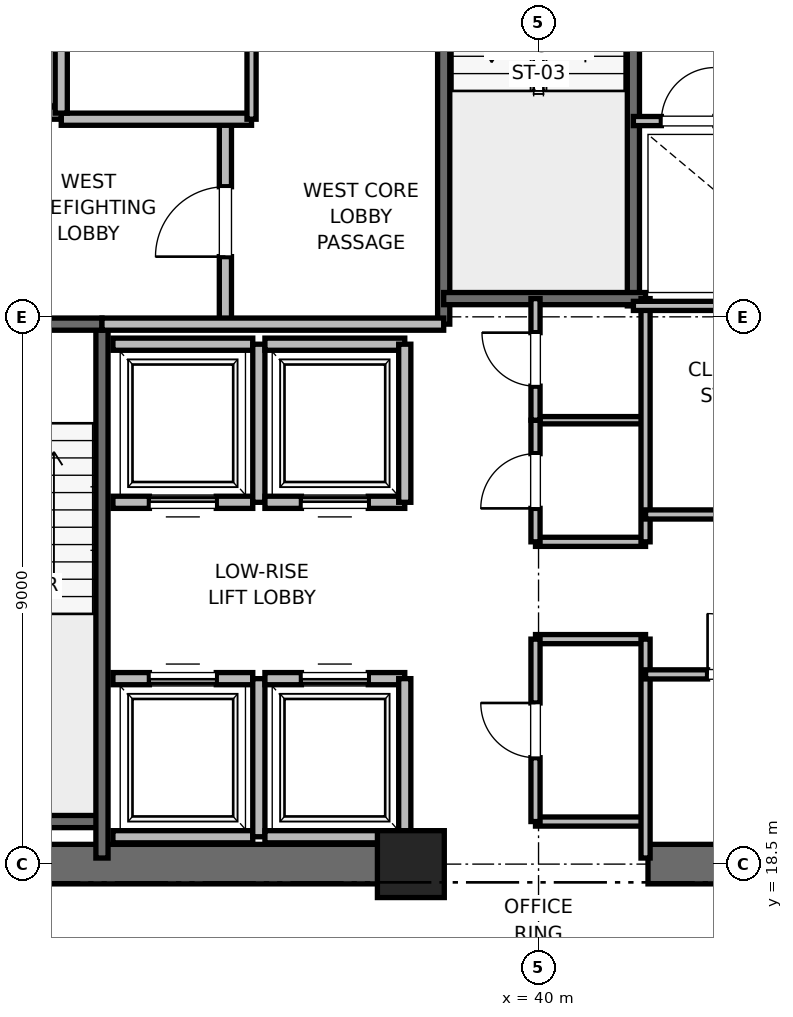
"""IFC4 building model, lengths in metres.
Left out: names, types, materials, properties, quantities, classifications, styles, units other than length and angle.
Written with IfcOpenShell. Run it as: python <this file> out.ifc"""

import sys

from ifc_helpers import new_model, si_unit, direction, frame, frame_2d, origin, origin_2d, place, context, subcontext, project, spatial, rectangle, extrude, element, fill, save


model = new_model("IFC4")
c1 = context("Model", 3, precision=1e-05, world=origin(), true_north=direction((0.0, 1.0)))
c2 = subcontext(c1, "Body", "Model", "MODEL_VIEW")
j1 = project(units=[si_unit("LENGTHUNIT", "METRE"), si_unit("PLANEANGLEUNIT", "RADIAN")], contexts=[c1])
p1 = place(None, origin())
s1 = spatial("IfcSite", under=j1, at=p1, CompositionType="ELEMENT")
p2 = place(p1, origin())
s2 = spatial("IfcBuilding", under=s1, at=p2, CompositionType="ELEMENT")
p3 = place(p2, frame((0.0, 0.0, 47.6)))
s3 = spatial("IfcBuildingStorey", under=s2, at=p3, CompositionType="ELEMENT", Elevation=47.6)
p4 = place(p3, frame((37.9, 18.5, 0.0), z_axis=(0.0, 0.0, 1.0), x_axis=(1.0, 0.0, 0.0)))
e1 = element("IfcColumn", 1, at=p4, inside=s3, PredefinedType="PILASTER", context=c2, shape_type="SweptSolid", body=[
    extrude(rectangle(XDim=1.1, YDim=1.1, at=origin_2d()), origin(), (0.0, 0.0, 1.0), 4.0),
])
for number, where, z_axis, x_axis in (
    (2, (29.0, 18.5, 0.0), (0.0, 0.0, 1.0), (1.0, 0.0, 0.0)),
    (3, (41.8, 18.5, 0.0), (0.0, 0.0, 1.0), (1.0, 0.0, 0.0)),
):
    element("IfcWall", number, at=place(p3, frame(where, z_axis=z_axis, x_axis=x_axis)), inside=s3, PredefinedType="SHEAR", context=c2, shape_type="SweptSolid", body=[
        extrude(rectangle(XDim=9.2, YDim=0.65, at=frame_2d((4.6, 0.0))), origin(), (0.0, 0.0, 1.0), 3.76),
    ])
p5 = place(p3, frame((29.7, 19.2, 0.0), z_axis=(0.0, 0.0, 1.0), x_axis=(1.0, 0.0, 0.0)))
e4 = element("IfcWall", 4, at=p5, inside=s3, PredefinedType="SOLIDWALL", context=c2, shape_type="SweptSolid", body=[
    extrude(rectangle(XDim=3.12, YDim=0.2, at=frame_2d((1.56, 0.0))), origin(), (0.0, 0.0, 1.0), 3.76),
])
p6 = place(p3, frame((32.82, 18.6, 0.0), z_axis=(0.0, 0.0, 1.0), x_axis=(0.0, 1.0, 0.0)))
e5 = element("IfcWall", 5, at=p6, inside=s3, PredefinedType="SOLIDWALL", context=c2, shape_type="SweptSolid", body=[
    extrude(rectangle(XDim=8.78, YDim=0.2, at=frame_2d((4.39, 0.0))), origin(), (0.0, 0.0, 1.0), 3.76),
])
p7 = place(p3, frame((29.7, 27.38, 0.0), z_axis=(0.0, 0.0, 1.0), x_axis=(1.0, 0.0, 0.0)))
e6 = element("IfcWall", 6, at=p7, inside=s3, PredefinedType="SOLIDWALL", context=c2, shape_type="SweptSolid", body=[
    extrude(rectangle(XDim=3.12, YDim=0.2, at=frame_2d((1.56, 0.0))), origin(), (0.0, 0.0, 1.0), 3.76),
])
p8 = place(p7, frame((1.01, 0.0, 0.0)))
e7 = element("IfcOpeningElement", 7, at=p8, cuts=e6, PredefinedType="OPENING", context=c2, shape_type="SweptSolid", body=[
    extrude(rectangle(XDim=1.1, YDim=2.15, at=frame_2d((0.55, 1.075))), frame((0.0, 0.1, 0.0), z_axis=(0.0, -1.0, 0.0), x_axis=(1.0, 0.0, 0.0)), (0.0, 0.0, 1.0), 0.2),
])
p9 = place(p3, frame((38.44, 27.38, 0.0), z_axis=(0.0, 0.0, 1.0), x_axis=(0.0, 1.0, 0.0)))
e8 = element("IfcWall", 8, at=p9, inside=s3, PredefinedType="SOLIDWALL", context=c2, shape_type="SweptSolid", body=[
    extrude(rectangle(XDim=8.87, YDim=0.2, at=frame_2d((4.435, 0.0))), origin(), (0.0, 0.0, 1.0), 3.76),
])
p10 = place(p3, frame((41.56, 27.68, 0.0), z_axis=(0.0, 0.0, 1.0), x_axis=(0.0, 1.0, 0.0)))
e9 = element("IfcWall", 9, at=p10, inside=s3, PredefinedType="SOLIDWALL", context=c2, shape_type="SweptSolid", body=[
    extrude(rectangle(XDim=8.57, YDim=0.2, at=frame_2d((4.285, 0.0))), origin(), (0.0, 0.0, 1.0), 3.76),
])
p11 = place(p3, frame((38.44, 27.8, 0.0), z_axis=(0.0, 0.0, 1.0), x_axis=(1.0, 0.0, 0.0)))
e10 = element("IfcWall", 10, at=p11, inside=s3, PredefinedType="SOLIDWALL", context=c2, shape_type="SweptSolid", body=[
    extrude(rectangle(XDim=3.32, YDim=0.2, at=frame_2d((1.66, 0.0))), origin(), (0.0, 0.0, 1.0), 3.76),
])
p12 = place(p3, frame((34.85, 27.38, 0.0), z_axis=(0.0, 0.0, 1.0), x_axis=(0.0, 1.0, 0.0)))
e11 = element("IfcWall", 11, at=p12, inside=s3, PredefinedType="PARTITIONING", context=c2, shape_type="SweptSolid", body=[
    extrude(rectangle(XDim=3.37, YDim=0.2, at=frame_2d((1.685, 0.0))), origin(), (0.0, 0.0, 1.0), 3.76),
])
p13 = place(p12, frame((1.11, 0.0, 0.0)))
e12 = element("IfcOpeningElement", 12, at=p13, cuts=e11, PredefinedType="OPENING", context=c2, shape_type="SweptSolid", body=[
    extrude(rectangle(XDim=1.15, YDim=2.2, at=frame_2d((0.575, 1.1))), frame((0.0, 0.1, 0.0), z_axis=(0.0, -1.0, 0.0), x_axis=(1.0, 0.0, 0.0)), (0.0, 0.0, 1.0), 0.2),
])
p14 = place(p3, frame((32.82, 27.38, 0.0), z_axis=(0.0, 0.0, 1.0), x_axis=(1.0, 0.0, 0.0)))
e13 = element("IfcWall", 13, at=p14, inside=s3, PredefinedType="PARTITIONING", context=c2, shape_type="SweptSolid", body=[
    extrude(rectangle(XDim=5.62, YDim=0.2, at=frame_2d((2.81, 0.0))), origin(), (0.0, 0.0, 1.0), 3.76),
])
p15 = place(p3, frame((32.15, 30.75, 0.0), z_axis=(0.0, 0.0, 1.0), x_axis=(1.0, 0.0, 0.0)))
e14 = element("IfcWall", 14, at=p15, inside=s3, PredefinedType="PARTITIONING", context=c2, shape_type="SweptSolid", body=[
    extrude(rectangle(XDim=3.13, YDim=0.2, at=frame_2d((1.565, 0.0))), origin(), (0.0, 0.0, 1.0), 3.76),
])
p16 = place(p3, frame((29.55, 30.85, 0.0), z_axis=(0.0, 0.0, 1.0), x_axis=(1.0, 0.0, 0.0)))
e15 = element("IfcWall", 15, at=p16, inside=s3, PredefinedType="SOLIDWALL", context=c2, shape_type="SweptSolid", body=[
    extrude(rectangle(XDim=2.6, YDim=0.2, at=frame_2d((1.3, 0.0))), origin(), (0.0, 0.0, 1.0), 2.54),
])
p17 = place(p16, frame((0.75, 0.0, 0.0)))
e16 = element("IfcOpeningElement", 16, at=p17, cuts=e15, PredefinedType="OPENING", context=c2, shape_type="SweptSolid", body=[
    extrude(rectangle(XDim=1.1, YDim=2.2, at=frame_2d((0.55, 1.1))), frame((0.0, 0.1, 0.0), z_axis=(0.0, -1.0, 0.0), x_axis=(1.0, 0.0, 0.0)), (0.0, 0.0, 1.0), 0.2),
])
p18 = place(p3, frame((32.15, 30.85, 0.0), z_axis=(0.0, 0.0, 1.0), x_axis=(0.0, 1.0, 0.0)))
e17 = element("IfcWall", 17, at=p18, inside=s3, PredefinedType="SOLIDWALL", context=c2, shape_type="SweptSolid", body=[
    extrude(rectangle(XDim=3.0, YDim=0.2, at=frame_2d((1.5, 0.0))), origin(), (0.0, 0.0, 1.0), 3.76),
])
p19 = place(p3, frame((33.0, 18.95, 0.0), z_axis=(0.0, 0.0, 1.0), x_axis=(1.0, 0.0, 0.0)))
e18 = element("IfcWall", 18, at=p19, inside=s3, PredefinedType="SOLIDWALL", context=c2, shape_type="SweptSolid", body=[
    extrude(rectangle(XDim=2.3, YDim=0.2, at=frame_2d((1.15, 0.0))), origin(), (0.0, 0.0, 1.0), 3.76),
])
p20 = place(p3, frame((35.3, 21.55, 0.0), z_axis=(0.0, 0.0, 1.0), x_axis=(-1.0, 0.0, 0.0)))
e19 = element("IfcWall", 19, at=p20, inside=s3, PredefinedType="SOLIDWALL", context=c2, shape_type="SweptSolid", body=[
    extrude(rectangle(XDim=2.3, YDim=0.2, at=frame_2d((1.15, 0.0))), origin(), (0.0, 0.0, 1.0), 3.76),
])
p21 = place(p20, frame((0.6, 0.0, 0.0)))
e20 = element("IfcOpeningElement", 20, at=p21, cuts=e19, PredefinedType="OPENING", context=c2, shape_type="SweptSolid", body=[
    extrude(rectangle(XDim=1.1, YDim=2.2, at=frame_2d((0.55, 1.1))), frame((0.0, 0.1, 0.0), z_axis=(0.0, -1.0, 0.0), x_axis=(1.0, 0.0, 0.0)), (0.0, 0.0, 1.0), 0.2),
])
p22 = place(p3, frame((35.4, 18.95, 0.0), z_axis=(0.0, 0.0, 1.0), x_axis=(0.0, 1.0, 0.0)))
e21 = element("IfcWall", 21, at=p22, inside=s3, PredefinedType="SOLIDWALL", context=c2, shape_type="SweptSolid", body=[
    extrude(rectangle(XDim=2.6, YDim=0.2, at=frame_2d((1.3, 0.0))), origin(), (0.0, 0.0, 1.0), 3.76),
])
p23 = place(p3, frame((35.5, 18.95, 0.0), z_axis=(0.0, 0.0, 1.0), x_axis=(1.0, 0.0, 0.0)))
e22 = element("IfcWall", 22, at=p23, inside=s3, PredefinedType="SOLIDWALL", context=c2, shape_type="SweptSolid", body=[
    extrude(rectangle(XDim=2.3, YDim=0.2, at=frame_2d((1.15, 0.0))), origin(), (0.0, 0.0, 1.0), 2.54),
])
p24 = place(p3, frame((37.8, 21.55, 0.0), z_axis=(0.0, 0.0, 1.0), x_axis=(-1.0, 0.0, 0.0)))
e23 = element("IfcWall", 23, at=p24, inside=s3, PredefinedType="SOLIDWALL", context=c2, shape_type="SweptSolid", body=[
    extrude(rectangle(XDim=2.3, YDim=0.2, at=frame_2d((1.15, 0.0))), origin(), (0.0, 0.0, 1.0), 3.76),
])
p25 = place(p24, frame((0.6, 0.0, 0.0)))
e24 = element("IfcOpeningElement", 24, at=p25, cuts=e23, PredefinedType="OPENING", context=c2, shape_type="SweptSolid", body=[
    extrude(rectangle(XDim=1.1, YDim=2.2, at=frame_2d((0.55, 1.1))), frame((0.0, 0.1, 0.0), z_axis=(0.0, -1.0, 0.0), x_axis=(1.0, 0.0, 0.0)), (0.0, 0.0, 1.0), 0.2),
])
p26 = place(p3, frame((37.8, 18.95, 0.0), z_axis=(0.0, 0.0, 1.0), x_axis=(0.0, 1.0, 0.0)))
e25 = element("IfcWall", 25, at=p26, inside=s3, PredefinedType="SOLIDWALL", context=c2, shape_type="SweptSolid", body=[
    extrude(rectangle(XDim=2.6, YDim=0.2, at=frame_2d((1.3, 0.0))), origin(), (0.0, 0.0, 1.0), 2.54),
])
p27 = place(p3, frame((33.0, 24.45, 0.0), z_axis=(0.0, 0.0, 1.0), x_axis=(1.0, 0.0, 0.0)))
e26 = element("IfcWall", 26, at=p27, inside=s3, PredefinedType="SOLIDWALL", context=c2, shape_type="SweptSolid", body=[
    extrude(rectangle(XDim=2.3, YDim=0.2, at=frame_2d((1.15, 0.0))), origin(), (0.0, 0.0, 1.0), 3.76),
])
p28 = place(p27, frame((0.6, 0.0, 0.0)))
e27 = element("IfcOpeningElement", 27, at=p28, cuts=e26, PredefinedType="OPENING", context=c2, shape_type="SweptSolid", body=[
    extrude(rectangle(XDim=1.1, YDim=2.2, at=frame_2d((0.55, 1.1))), frame((0.0, 0.1, 0.0), z_axis=(0.0, -1.0, 0.0), x_axis=(1.0, 0.0, 0.0)), (0.0, 0.0, 1.0), 0.2),
])
p29 = place(p3, frame((35.3, 27.05, 0.0), z_axis=(0.0, 0.0, 1.0), x_axis=(-1.0, 0.0, 0.0)))
e28 = element("IfcWall", 28, at=p29, inside=s3, PredefinedType="SOLIDWALL", context=c2, shape_type="SweptSolid", body=[
    extrude(rectangle(XDim=2.3, YDim=0.2, at=frame_2d((1.15, 0.0))), origin(), (0.0, 0.0, 1.0), 3.76),
])
p30 = place(p3, frame((35.4, 24.45, 0.0), z_axis=(0.0, 0.0, 1.0), x_axis=(0.0, 1.0, 0.0)))
e29 = element("IfcWall", 29, at=p30, inside=s3, PredefinedType="SOLIDWALL", context=c2, shape_type="SweptSolid", body=[
    extrude(rectangle(XDim=2.6, YDim=0.2, at=frame_2d((1.3, 0.0))), origin(), (0.0, 0.0, 1.0), 3.76),
])
p31 = place(p3, frame((35.5, 24.45, 0.0), z_axis=(0.0, 0.0, 1.0), x_axis=(1.0, 0.0, 0.0)))
e30 = element("IfcWall", 30, at=p31, inside=s3, PredefinedType="SOLIDWALL", context=c2, shape_type="SweptSolid", body=[
    extrude(rectangle(XDim=2.3, YDim=0.2, at=frame_2d((1.15, 0.0))), origin(), (0.0, 0.0, 1.0), 3.76),
])
p32 = place(p31, frame((0.6, 0.0, 0.0)))
e31 = element("IfcOpeningElement", 31, at=p32, cuts=e30, PredefinedType="OPENING", context=c2, shape_type="SweptSolid", body=[
    extrude(rectangle(XDim=1.1, YDim=2.2, at=frame_2d((0.55, 1.1))), frame((0.0, 0.1, 0.0), z_axis=(0.0, -1.0, 0.0), x_axis=(1.0, 0.0, 0.0)), (0.0, 0.0, 1.0), 0.2),
])
p33 = place(p3, frame((37.8, 27.05, 0.0), z_axis=(0.0, 0.0, 1.0), x_axis=(-1.0, 0.0, 0.0)))
e32 = element("IfcWall", 32, at=p33, inside=s3, PredefinedType="SOLIDWALL", context=c2, shape_type="SweptSolid", body=[
    extrude(rectangle(XDim=2.3, YDim=0.2, at=frame_2d((1.15, 0.0))), origin(), (0.0, 0.0, 1.0), 3.76),
])
p34 = place(p3, frame((37.8, 24.45, 0.0), z_axis=(0.0, 0.0, 1.0), x_axis=(0.0, 1.0, 0.0)))
e33 = element("IfcWall", 33, at=p34, inside=s3, PredefinedType="SOLIDWALL", context=c2, shape_type="SweptSolid", body=[
    extrude(rectangle(XDim=2.6, YDim=0.2, at=frame_2d((1.3, 0.0))), origin(), (0.0, 0.0, 1.0), 3.76),
])
for number, where, z_axis, x_axis in (
    (34, (39.95, 19.2, 0.0), (0.0, 0.0, 1.0), (1.0, 0.0, 0.0)),
    (35, (39.95, 22.2, 0.0), (0.0, 0.0, 1.0), (1.0, 0.0, 0.0)),
    (36, (39.95, 23.8, 0.0), (0.0, 0.0, 1.0), (1.0, 0.0, 0.0)),
):
    element("IfcWall", number, at=place(p3, frame(where, z_axis=z_axis, x_axis=x_axis)), inside=s3, PredefinedType="PARTITIONING", context=c2, shape_type="SweptSolid", body=[
        extrude(rectangle(XDim=1.81, YDim=0.15, at=frame_2d((0.905, 0.0))), origin(), (0.0, 0.0, 1.0), 2.85),
    ])
p35 = place(p3, frame((39.95, 25.8, 0.0), z_axis=(0.0, 0.0, 1.0), x_axis=(1.0, 0.0, 0.0)))
e37 = element("IfcWall", 37, at=p35, inside=s3, PredefinedType="PARTITIONING", context=c2, shape_type="SweptSolid", body=[
    extrude(rectangle(XDim=1.81, YDim=0.12, at=frame_2d((0.905, 0.0))), origin(), (0.0, 0.0, 1.0), 2.85),
])
p36 = place(p3, frame((41.76, 18.6, 0.0), z_axis=(0.0, 0.0, 1.0), x_axis=(0.0, 1.0, 0.0)))
e38 = element("IfcWall", 38, at=p36, inside=s3, PredefinedType="PARTITIONING", context=c2, shape_type="SweptSolid", body=[
    extrude(rectangle(XDim=3.6, YDim=0.15, at=frame_2d((1.8, 0.0))), origin(), (0.0, 0.0, 1.0), 2.54),
])
p37 = place(p3, frame((41.76, 23.8, 0.0), z_axis=(0.0, 0.0, 1.0), x_axis=(0.0, 1.0, 0.0)))
e39 = element("IfcWall", 39, at=p37, inside=s3, PredefinedType="PARTITIONING", context=c2, shape_type="SweptSolid", body=[
    extrude(rectangle(XDim=4.0, YDim=0.15, at=frame_2d((2.0, 0.0))), origin(), (0.0, 0.0, 1.0), 2.85),
])
p38 = place(p3, frame((39.95, 19.2, 0.0), z_axis=(0.0, 0.0, 1.0), x_axis=(0.0, 1.0, 0.0)))
e40 = element("IfcWall", 40, at=p38, inside=s3, PredefinedType="PARTITIONING", context=c2, shape_type="SweptSolid", body=[
    extrude(rectangle(XDim=3.0, YDim=0.15, at=frame_2d((1.5, 0.0))), origin(), (0.0, 0.0, 1.0), 2.85),
])
p39 = place(p38, frame((1.05, 0.0, 0.0)))
e41 = element("IfcOpeningElement", 41, at=p39, cuts=e40, PredefinedType="OPENING", context=c2, shape_type="SweptSolid", body=[
    extrude(rectangle(XDim=0.9, YDim=2.1, at=frame_2d((0.45, 1.05))), frame((0.0, 0.075, 0.0), z_axis=(0.0, -1.0, 0.0), x_axis=(1.0, 0.0, 0.0)), (0.0, 0.0, 1.0), 0.15),
])
p40 = place(p3, frame((39.95, 23.8, 0.0), z_axis=(0.0, 0.0, 1.0), x_axis=(0.0, 1.0, 0.0)))
e42 = element("IfcWall", 42, at=p40, inside=s3, PredefinedType="PARTITIONING", context=c2, shape_type="SweptSolid", body=[
    extrude(rectangle(XDim=2.0, YDim=0.15, at=frame_2d((1.0, 0.0))), origin(), (0.0, 0.0, 1.0), 2.85),
])
p41 = place(p40, frame((0.55, 0.0, 0.0)))
e43 = element("IfcOpeningElement", 43, at=p41, cuts=e42, PredefinedType="OPENING", context=c2, shape_type="SweptSolid", body=[
    extrude(rectangle(XDim=0.9, YDim=2.1, at=frame_2d((0.45, 1.05))), frame((0.0, 0.075, 0.0), z_axis=(0.0, -1.0, 0.0), x_axis=(1.0, 0.0, 0.0)), (0.0, 0.0, 1.0), 0.15),
])
p42 = place(p3, frame((39.95, 25.8, 0.0), z_axis=(0.0, 0.0, 1.0), x_axis=(0.0, 1.0, 0.0)))
e44 = element("IfcWall", 44, at=p42, inside=s3, PredefinedType="PARTITIONING", context=c2, shape_type="SweptSolid", body=[
    extrude(rectangle(XDim=2.0, YDim=0.15, at=frame_2d((1.0, 0.0))), origin(), (0.0, 0.0, 1.0), 2.85),
])
p43 = place(p42, frame((0.56, 0.0, 0.0)))
e45 = element("IfcOpeningElement", 45, at=p43, cuts=e44, PredefinedType="OPENING", context=c2, shape_type="SweptSolid", body=[
    extrude(rectangle(XDim=0.88, YDim=2.1, at=frame_2d((0.44, 1.05))), frame((0.0, 0.075, 0.0), z_axis=(0.0, -1.0, 0.0), x_axis=(1.0, 0.0, 0.0)), (0.0, 0.0, 1.0), 0.15),
])
p44 = place(p3, frame((35.28, 30.75, 0.0), z_axis=(0.0, 0.0, 1.0), x_axis=(0.0, 1.0, 0.0)))
e46 = element("IfcWall", 46, at=p44, inside=s3, PredefinedType="PARTITIONING", context=c2, shape_type="SweptSolid", body=[
    extrude(rectangle(XDim=3.2, YDim=0.15, at=frame_2d((1.6, 0.0))), origin(), (0.0, 0.0, 1.0), 2.85),
])
p45 = place(p44, frame((1.15, 0.0, 0.0)))
e47 = element("IfcOpeningElement", 47, at=p45, cuts=e46, PredefinedType="OPENING", context=c2, shape_type="SweptSolid", body=[
    extrude(rectangle(XDim=0.9, YDim=2.1, at=frame_2d((0.45, 1.05))), frame((0.0, 0.075, 0.0), z_axis=(0.0, -1.0, 0.0), x_axis=(1.0, 0.0, 0.0)), (0.0, 0.0, 1.0), 0.15),
])
p46 = place(p3, frame((41.56, 27.68, 0.0), z_axis=(0.0, 0.0, 1.0), x_axis=(1.0, 0.0, 0.0)))
e48 = element("IfcWall", 48, at=p46, inside=s3, PredefinedType="PARTITIONING", context=c2, shape_type="SweptSolid", body=[
    extrude(rectangle(XDim=3.59, YDim=0.15, at=frame_2d((1.795, 0.0))), origin(), (0.0, 0.0, 1.0), 2.85),
])
p47 = place(p3, frame((41.76, 21.62, 0.0), z_axis=(0.0, 0.0, 1.0), x_axis=(1.0, 0.0, 0.0)))
e49 = element("IfcWall", 49, at=p47, inside=s3, PredefinedType="PARTITIONING", context=c2, shape_type="SweptSolid", body=[
    extrude(rectangle(XDim=3.04, YDim=0.15, at=frame_2d((1.52, 0.0))), origin(), (0.0, 0.0, 1.0), 2.85),
])
p48 = place(p47, frame((1.02, 0.0, 0.0)))
e50 = element("IfcOpeningElement", 50, at=p48, cuts=e49, PredefinedType="OPENING", context=c2, shape_type="SweptSolid", body=[
    extrude(rectangle(XDim=1.0, YDim=2.15, at=frame_2d((0.5, 1.075))), frame((0.0, 0.075, 0.0), z_axis=(0.0, -1.0, 0.0), x_axis=(1.0, 0.0, 0.0)), (0.0, 0.0, 1.0), 0.15),
])
p49 = place(p3, frame((41.76, 24.25, 0.0), z_axis=(0.0, 0.0, 1.0), x_axis=(1.0, 0.0, 0.0)))
e51 = element("IfcWall", 51, at=p49, inside=s3, PredefinedType="PARTITIONING", context=c2, shape_type="SweptSolid", body=[
    extrude(rectangle(XDim=3.39, YDim=0.15, at=frame_2d((1.695, 0.0))), origin(), (0.0, 0.0, 1.0), 2.85),
])
p50 = place(p49, frame((1.255, 0.0, 0.0)))
e52 = element("IfcOpeningElement", 52, at=p50, cuts=e51, PredefinedType="OPENING", context=c2, shape_type="SweptSolid", body=[
    extrude(rectangle(XDim=0.88, YDim=2.1, at=frame_2d((0.44, 1.05))), frame((0.0, 0.075, 0.0), z_axis=(0.0, -1.0, 0.0), x_axis=(1.0, 0.0, 0.0)), (0.0, 0.0, 1.0), 0.15),
])
p51 = place(p3, frame((41.56, 30.72, 0.0), z_axis=(0.0, 0.0, 1.0), x_axis=(1.0, 0.0, 0.0)))
e53 = element("IfcWall", 53, at=p51, inside=s3, PredefinedType="PARTITIONING", context=c2, shape_type="SweptSolid", body=[
    extrude(rectangle(XDim=1.8, YDim=0.15, at=frame_2d((0.9, 0.0))), origin(), (0.0, 0.0, 1.0), 2.85),
])
p52 = place(p51, frame((0.46, 0.0, 0.0)))
e54 = element("IfcOpeningElement", 54, at=p52, cuts=e53, PredefinedType="OPENING", context=c2, shape_type="SweptSolid", body=[
    extrude(rectangle(XDim=0.88, YDim=2.1, at=frame_2d((0.44, 1.05))), frame((0.0, 0.075, 0.0), z_axis=(0.0, -1.0, 0.0), x_axis=(1.0, 0.0, 0.0)), (0.0, 0.0, 1.0), 0.15),
])
p53 = place(p13, origin())
e55 = element("IfcDoor", 55, at=p53, inside=s3, OperationType="SINGLE_SWING_LEFT", PredefinedType="DOOR", context=c2, shape_type="SweptSolid", body=[
    extrude(rectangle(XDim=1.15, YDim=2.2, at=frame_2d((0.575, 1.1))), frame((0.0, 0.025, 0.0), z_axis=(0.0, -1.0, 0.0), x_axis=(1.0, 0.0, 0.0)), (0.0, 0.0, 1.0), 0.05),
])
fill(e12, e55)
p54 = place(p21, origin())
e56 = element("IfcDoor", 56, at=p54, inside=s3, OperationType="SLIDING_TO_RIGHT", PredefinedType="DOOR", context=c2, shape_type="SweptSolid", body=[
    extrude(rectangle(XDim=1.1, YDim=2.2, at=frame_2d((0.55, 1.1))), frame((0.0, 0.025, 0.0), z_axis=(0.0, -1.0, 0.0), x_axis=(1.0, 0.0, 0.0)), (0.0, 0.0, 1.0), 0.05),
])
fill(e20, e56)
p55 = place(p25, origin())
e57 = element("IfcDoor", 57, at=p55, inside=s3, OperationType="SLIDING_TO_RIGHT", PredefinedType="DOOR", context=c2, shape_type="SweptSolid", body=[
    extrude(rectangle(XDim=1.1, YDim=2.2, at=frame_2d((0.55, 1.1))), frame((0.0, 0.025, 0.0), z_axis=(0.0, -1.0, 0.0), x_axis=(1.0, 0.0, 0.0)), (0.0, 0.0, 1.0), 0.05),
])
fill(e24, e57)
p56 = place(p28, origin())
e58 = element("IfcDoor", 58, at=p56, inside=s3, OperationType="SLIDING_TO_RIGHT", PredefinedType="DOOR", context=c2, shape_type="SweptSolid", body=[
    extrude(rectangle(XDim=1.1, YDim=2.2, at=frame_2d((0.55, 1.1))), frame((0.0, 0.025, 0.0), z_axis=(0.0, -1.0, 0.0), x_axis=(1.0, 0.0, 0.0)), (0.0, 0.0, 1.0), 0.05),
])
fill(e27, e58)
p57 = place(p32, origin())
e59 = element("IfcDoor", 59, at=p57, inside=s3, OperationType="SLIDING_TO_RIGHT", PredefinedType="DOOR", context=c2, shape_type="SweptSolid", body=[
    extrude(rectangle(XDim=1.1, YDim=2.2, at=frame_2d((0.55, 1.1))), frame((0.0, 0.025, 0.0), z_axis=(0.0, -1.0, 0.0), x_axis=(1.0, 0.0, 0.0)), (0.0, 0.0, 1.0), 0.05),
])
fill(e31, e59)
p58 = place(p39, origin())
e60 = element("IfcDoor", 60, at=p58, inside=s3, OperationType="SINGLE_SWING_RIGHT", PredefinedType="DOOR", context=c2, shape_type="SweptSolid", body=[
    extrude(rectangle(XDim=0.9, YDim=2.1, at=frame_2d((0.45, 1.05))), frame((0.0, 0.025, 0.0), z_axis=(0.0, -1.0, 0.0), x_axis=(1.0, 0.0, 0.0)), (0.0, 0.0, 1.0), 0.05),
])
fill(e41, e60)
p59 = place(p41, origin())
e61 = element("IfcDoor", 61, at=p59, inside=s3, OperationType="SINGLE_SWING_LEFT", PredefinedType="DOOR", context=c2, shape_type="SweptSolid", body=[
    extrude(rectangle(XDim=0.9, YDim=2.1, at=frame_2d((0.45, 1.05))), frame((0.0, 0.025, 0.0), z_axis=(0.0, -1.0, 0.0), x_axis=(1.0, 0.0, 0.0)), (0.0, 0.0, 1.0), 0.05),
])
fill(e43, e61)
p60 = place(p43, origin())
e62 = element("IfcDoor", 62, at=p60, inside=s3, OperationType="SINGLE_SWING_RIGHT", PredefinedType="DOOR", context=c2, shape_type="SweptSolid", body=[
    extrude(rectangle(XDim=0.88, YDim=2.1, at=frame_2d((0.44, 1.05))), frame((0.0, 0.025, 0.0), z_axis=(0.0, -1.0, 0.0), x_axis=(1.0, 0.0, 0.0)), (0.0, 0.0, 1.0), 0.05),
])
fill(e45, e62)
p61 = place(p48, origin())
e63 = element("IfcDoor", 63, at=p61, inside=s3, OperationType="SINGLE_SWING_LEFT", PredefinedType="DOOR", context=c2, shape_type="SweptSolid", body=[
    extrude(rectangle(XDim=1.0, YDim=2.15, at=frame_2d((0.5, 1.075))), frame((0.0, 0.025, 0.0), z_axis=(0.0, -1.0, 0.0), x_axis=(1.0, 0.0, 0.0)), (0.0, 0.0, 1.0), 0.05),
])
fill(e50, e63)
p62 = place(p52, origin())
e64 = element("IfcDoor", 64, at=p62, inside=s3, OperationType="SINGLE_SWING_RIGHT", PredefinedType="DOOR", context=c2, shape_type="SweptSolid", body=[
    extrude(rectangle(XDim=0.88, YDim=2.1, at=frame_2d((0.44, 1.05))), frame((0.0, 0.025, 0.0), z_axis=(0.0, -1.0, 0.0), x_axis=(1.0, 0.0, 0.0)), (0.0, 0.0, 1.0), 0.05),
])
fill(e54, e64)
save(model, sys.argv[1])
